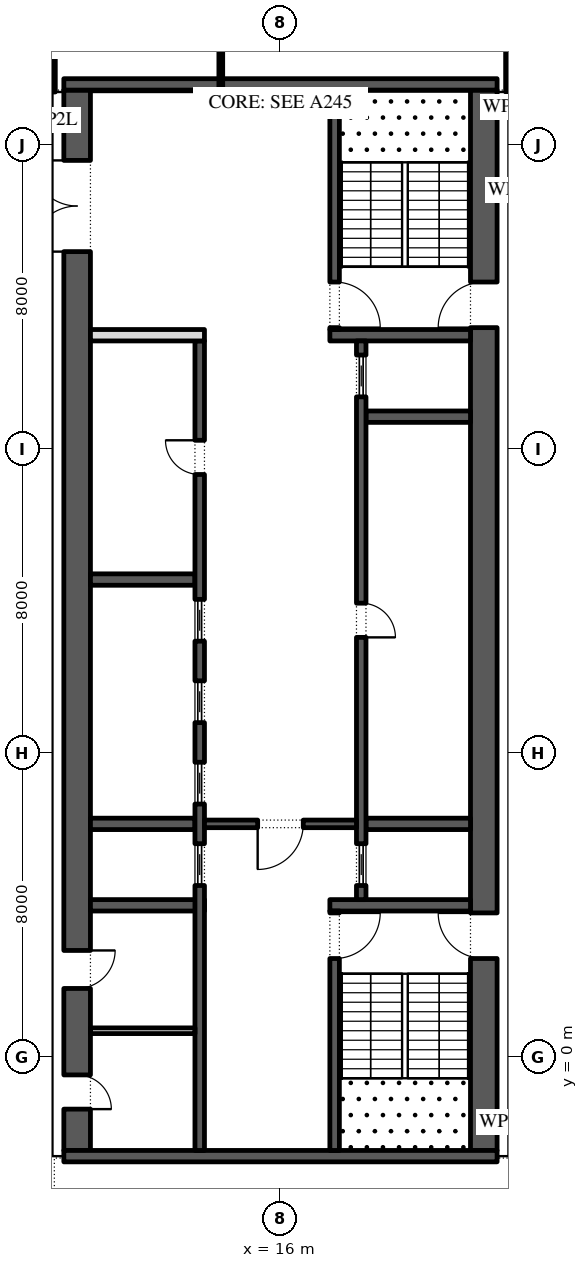
"""IFC4 building model, lengths in metres.
Left out: names, types, materials, properties, quantities, classifications, styles, units other than length and angle.
Written with IfcOpenShell. Run it as: python <this file> out.ifc"""

import sys

from ifc_helpers import new_model, si_unit, direction, frame, frame_2d, origin, place, context, subcontext, project, spatial, rectangle, extrude, element, fill, save


model = new_model("IFC4")
c1 = context("Model", 3, precision=1e-05, world=origin(), true_north=direction((0.0, 1.0)))
c2 = subcontext(c1, "Body", "Model", "MODEL_VIEW")
j1 = project(units=[si_unit("LENGTHUNIT", "METRE"), si_unit("PLANEANGLEUNIT", "RADIAN")], contexts=[c1])
p1 = place(None, origin())
s1 = spatial("IfcSite", under=j1, at=p1, CompositionType="ELEMENT")
p2 = place(p1, origin())
s2 = spatial("IfcBuilding", under=s1, at=p2, CompositionType="ELEMENT")
p3 = place(p2, frame((0.0, 0.0, 192.6)))
s3 = spatial("IfcBuildingStorey", under=s2, at=p3, CompositionType="ELEMENT", Elevation=192.6)
p4 = place(p3, frame((33.157, -5.092, 0.0), z_axis=(0.0, 0.0, 1.0), x_axis=(-0.224950279389, 0.974370243697, 0.0)))
e1 = element("IfcWall", 1, at=p4, inside=s3, PredefinedType="STANDARD", context=c2, shape_type="SweptSolid", body=[
    extrude(rectangle(XDim=49.5, YDim=0.3, at=frame_2d((24.75, 0.0))), origin(), (0.0, 0.0, 1.0), 4.0),
])
p5 = place(p4, frame((2.207, 0.0, 0.0)))
e2 = element("IfcOpeningElement", 2, at=p5, cuts=e1, PredefinedType="OPENING", context=c2, shape_type="SweptSolid", body=[
    extrude(rectangle(XDim=2.4, YDim=3.125, at=frame_2d((1.2, 1.562))), frame((0.0, 0.16, 0.0), z_axis=(0.0, -1.0, 0.0), x_axis=(1.0, 0.0, 0.0)), (0.0, 0.0, 1.0), 0.32),
])
p6 = place(p4, frame((8.121, 0.0, 0.45)))
e3 = element("IfcOpeningElement", 3, at=p6, cuts=e1, PredefinedType="OPENING", context=c2, shape_type="SweptSolid", body=[
    extrude(rectangle(XDim=4.5, YDim=2.875, at=frame_2d((2.25, 1.438))), frame((0.0, 0.16, 0.0), z_axis=(0.0, -1.0, 0.0), x_axis=(1.0, 0.0, 0.0)), (0.0, 0.0, 1.0), 0.32),
])
p7 = place(p4, frame((15.236, 0.0, 0.45)))
e4 = element("IfcOpeningElement", 4, at=p7, cuts=e1, PredefinedType="OPENING", context=c2, shape_type="SweptSolid", body=[
    extrude(rectangle(XDim=4.5, YDim=2.875, at=frame_2d((2.25, 1.438))), frame((0.0, 0.16, 0.0), z_axis=(0.0, -1.0, 0.0), x_axis=(1.0, 0.0, 0.0)), (0.0, 0.0, 1.0), 0.32),
])
p8 = place(p4, frame((22.35, 0.0, 0.45)))
e5 = element("IfcOpeningElement", 5, at=p8, cuts=e1, PredefinedType="OPENING", context=c2, shape_type="SweptSolid", body=[
    extrude(rectangle(XDim=4.5, YDim=3.0, at=frame_2d((2.25, 1.5))), frame((0.0, 0.16, 0.0), z_axis=(0.0, -1.0, 0.0), x_axis=(1.0, 0.0, 0.0)), (0.0, 0.0, 1.0), 0.32),
])
p9 = place(p4, frame((30.514, 0.0, 0.0)))
e6 = element("IfcOpeningElement", 6, at=p9, cuts=e1, PredefinedType="OPENING", context=c2, shape_type="SweptSolid", body=[
    extrude(rectangle(XDim=2.4, YDim=3.45, at=frame_2d((1.2, 1.725))), frame((0.0, 0.16, 0.0), z_axis=(0.0, -1.0, 0.0), x_axis=(1.0, 0.0, 0.0)), (0.0, 0.0, 1.0), 0.32),
])
p10 = place(p4, frame((36.579, 0.0, 0.45)))
e7 = element("IfcOpeningElement", 7, at=p10, cuts=e1, PredefinedType="OPENING", context=c2, shape_type="SweptSolid", body=[
    extrude(rectangle(XDim=4.5, YDim=3.05, at=frame_2d((2.25, 1.525))), frame((0.0, 0.16, 0.0), z_axis=(0.0, -1.0, 0.0), x_axis=(1.0, 0.0, 0.0)), (0.0, 0.0, 1.0), 0.32),
])
p11 = place(p4, frame((43.693, 0.0, 0.45)))
e8 = element("IfcOpeningElement", 8, at=p11, cuts=e1, PredefinedType="OPENING", context=c2, shape_type="SweptSolid", body=[
    extrude(rectangle(XDim=4.5, YDim=3.05, at=frame_2d((2.25, 1.525))), frame((0.0, 0.16, 0.0), z_axis=(0.0, -1.0, 0.0), x_axis=(1.0, 0.0, 0.0)), (0.0, 0.0, 1.0), 0.32),
])
p12 = place(p3, frame((21.35, -2.45, 0.0), z_axis=(0.0, 0.0, 1.0), x_axis=(0.0, 1.0, 0.0)))
e9 = element("IfcWall", 9, at=p12, inside=s3, PredefinedType="SHEAR", context=c2, shape_type="SweptSolid", body=[
    extrude(rectangle(XDim=27.9, YDim=0.7, at=frame_2d((13.95, 0.0))), origin(), (0.0, 0.0, 1.0), 4.0),
])
p13 = place(p12, frame((5.05, 0.0, 0.0)))
e10 = element("IfcOpeningElement", 10, at=p13, cuts=e9, PredefinedType="OPENING", context=c2, shape_type="SweptSolid", body=[
    extrude(rectangle(XDim=1.2, YDim=2.1, at=frame_2d((0.6, 1.05))), frame((0.0, 0.36, 0.0), z_axis=(0.0, -1.0, 0.0), x_axis=(1.0, 0.0, 0.0)), (0.0, 0.0, 1.0), 0.72),
])
p14 = place(p12, frame((21.65, 0.0, 0.0)))
e11 = element("IfcOpeningElement", 11, at=p14, cuts=e9, PredefinedType="OPENING", context=c2, shape_type="SweptSolid", body=[
    extrude(rectangle(XDim=1.2, YDim=2.1, at=frame_2d((0.6, 1.05))), frame((0.0, 0.36, 0.0), z_axis=(0.0, -1.0, 0.0), x_axis=(1.0, 0.0, 0.0)), (0.0, 0.0, 1.0), 0.72),
])
p15 = place(p3, frame((10.65, -2.45, 0.0), z_axis=(0.0, 0.0, 1.0), x_axis=(0.0, 1.0, 0.0)))
e12 = element("IfcWall", 12, at=p15, inside=s3, PredefinedType="SHEAR", context=c2, shape_type="SweptSolid", body=[
    extrude(rectangle(XDim=27.9, YDim=0.7, at=frame_2d((13.95, 0.0))), origin(), (0.0, 0.0, 1.0), 4.0),
])
p16 = place(p15, frame((23.65, 0.0, 0.0)))
e13 = element("IfcOpeningElement", 13, at=p16, cuts=e12, PredefinedType="OPENING", context=c2, shape_type="SweptSolid", body=[
    extrude(rectangle(XDim=2.4, YDim=2.1, at=frame_2d((1.2, 1.05))), frame((0.0, 0.36, 0.0), z_axis=(0.0, -1.0, 0.0), x_axis=(1.0, 0.0, 0.0)), (0.0, 0.0, 1.0), 0.72),
])
p17 = place(p15, frame((1.087, 0.0, 0.0)))
e14 = element("IfcOpeningElement", 14, at=p17, cuts=e12, PredefinedType="OPENING", context=c2, shape_type="SweptSolid", body=[
    extrude(rectangle(XDim=0.9, YDim=2.1, at=frame_2d((0.45, 1.05))), frame((0.0, 0.36, 0.0), z_axis=(0.0, -1.0, 0.0), x_axis=(1.0, 0.0, 0.0)), (0.0, 0.0, 1.0), 0.72),
])
p18 = place(p15, frame((4.262, 0.0, 0.0)))
e15 = element("IfcOpeningElement", 15, at=p18, cuts=e12, PredefinedType="OPENING", context=c2, shape_type="SweptSolid", body=[
    extrude(rectangle(XDim=1.0, YDim=2.1, at=frame_2d((0.5, 1.05))), frame((0.0, 0.36, 0.0), z_axis=(0.0, -1.0, 0.0), x_axis=(1.0, 0.0, 0.0)), (0.0, 0.0, 1.0), 0.72),
])
for number, where, z_axis, x_axis in (
    (16, (10.3, -2.6, 0.0), (0.0, 0.0, 1.0), (1.0, 0.0, 0.0)),
    (17, (10.3, 25.6, 0.0), (0.0, 0.0, 1.0), (1.0, 0.0, 0.0)),
):
    element("IfcWall", number, at=place(p3, frame(where, z_axis=z_axis, x_axis=x_axis)), inside=s3, PredefinedType="SHEAR", context=c2, shape_type="SweptSolid", body=[
        extrude(rectangle(XDim=11.4, YDim=0.3, at=frame_2d((5.7, 0.0))), origin(), (0.0, 0.0, 1.0), 4.0),
    ])
p19 = place(p3, frame((17.3, 4.0, 0.0), z_axis=(0.0, 0.0, 1.0), x_axis=(1.0, 0.0, 0.0)))
e18 = element("IfcWall", 18, at=p19, inside=s3, PredefinedType="SHEAR", context=c2, shape_type="SweptSolid", body=[
    extrude(rectangle(XDim=3.7, YDim=0.3, at=frame_2d((1.85, 0.0))), origin(), (0.0, 0.0, 1.0), 4.0),
])
p20 = place(p3, frame((17.425, -2.45, 0.0), z_axis=(0.0, 0.0, 1.0), x_axis=(0.0, 1.0, 0.0)))
e19 = element("IfcWall", 19, at=p20, inside=s3, PredefinedType="SHEAR", context=c2, shape_type="SweptSolid", body=[
    extrude(rectangle(XDim=6.3, YDim=0.25, at=frame_2d((3.15, 0.0))), origin(), (0.0, 0.0, 1.0), 4.0),
])
p21 = place(p20, frame((5.05, 0.0, 0.0)))
e20 = element("IfcOpeningElement", 20, at=p21, cuts=e19, PredefinedType="OPENING", context=c2, shape_type="SweptSolid", body=[
    extrude(rectangle(XDim=1.2, YDim=2.1, at=frame_2d((0.6, 1.05))), frame((0.0, 0.135, 0.0), z_axis=(0.0, -1.0, 0.0), x_axis=(1.0, 0.0, 0.0)), (0.0, 0.0, 1.0), 0.27),
])
p22 = place(p3, frame((17.3, 19.0, 0.0), z_axis=(0.0, 0.0, 1.0), x_axis=(1.0, 0.0, 0.0)))
e21 = element("IfcWall", 21, at=p22, inside=s3, PredefinedType="SHEAR", context=c2, shape_type="SweptSolid", body=[
    extrude(rectangle(XDim=3.7, YDim=0.3, at=frame_2d((1.85, 0.0))), origin(), (0.0, 0.0, 1.0), 4.0),
])
p23 = place(p3, frame((17.425, 19.15, 0.0), z_axis=(0.0, 0.0, 1.0), x_axis=(0.0, 1.0, 0.0)))
e22 = element("IfcWall", 22, at=p23, inside=s3, PredefinedType="SHEAR", context=c2, shape_type="SweptSolid", body=[
    extrude(rectangle(XDim=6.3, YDim=0.25, at=frame_2d((3.15, 0.0))), origin(), (0.0, 0.0, 1.0), 4.0),
])
p24 = place(p23, frame((0.05, 0.0, 0.0)))
e23 = element("IfcOpeningElement", 23, at=p24, cuts=e22, PredefinedType="OPENING", context=c2, shape_type="SweptSolid", body=[
    extrude(rectangle(XDim=1.2, YDim=2.1, at=frame_2d((0.6, 1.05))), frame((0.0, 0.135, 0.0), z_axis=(0.0, -1.0, 0.0), x_axis=(1.0, 0.0, 0.0)), (0.0, 0.0, 1.0), 0.27),
])
for number, where, z_axis, x_axis in (
    (24, (18.25, 6.143, 0.0), (0.0, 0.0, 1.0), (1.0, 0.0, 0.0)),
    (25, (18.25, 16.857, 0.0), (0.0, 0.0, 1.0), (1.0, 0.0, 0.0)),
):
    element("IfcWall", number, at=place(p3, frame(where, z_axis=z_axis, x_axis=x_axis)), inside=s3, PredefinedType="SHEAR", context=c2, shape_type="SweptSolid", body=[
        extrude(rectangle(XDim=2.75, YDim=0.3, at=frame_2d((1.375, 0.0))), origin(), (0.0, 0.0, 1.0), 4.0),
    ])
p25 = place(p3, frame((18.125, 4.15, 0.0), z_axis=(0.0, 0.0, 1.0), x_axis=(0.0, 1.0, 0.0)))
e26 = element("IfcWall", 26, at=p25, inside=s3, PredefinedType="SHEAR", context=c2, shape_type="SweptSolid", body=[
    extrude(rectangle(XDim=14.7, YDim=0.25, at=frame_2d((7.35, 0.0))), origin(), (0.0, 0.0, 1.0), 4.0),
])
p26 = place(p25, frame((6.9, 0.0, 0.0)))
e27 = element("IfcOpeningElement", 27, at=p26, cuts=e26, PredefinedType="OPENING", context=c2, shape_type="SweptSolid", body=[
    extrude(rectangle(XDim=0.9, YDim=2.1, at=frame_2d((0.45, 1.05))), frame((0.0, 0.135, 0.0), z_axis=(0.0, -1.0, 0.0), x_axis=(1.0, 0.0, 0.0)), (0.0, 0.0, 1.0), 0.27),
])
p27 = place(p25, frame((0.371, 0.0, 0.0)))
e28 = element("IfcOpeningElement", 28, at=p27, cuts=e26, PredefinedType="OPENING", context=c2, shape_type="SweptSolid", body=[
    extrude(rectangle(XDim=1.1, YDim=2.1, at=frame_2d((0.55, 1.05))), frame((0.0, 0.135, 0.0), z_axis=(0.0, -1.0, 0.0), x_axis=(1.0, 0.0, 0.0)), (0.0, 0.0, 1.0), 0.27),
])
p28 = place(p25, frame((13.229, 0.0, 0.0)))
e29 = element("IfcOpeningElement", 29, at=p28, cuts=e26, PredefinedType="OPENING", context=c2, shape_type="SweptSolid", body=[
    extrude(rectangle(XDim=1.1, YDim=2.1, at=frame_2d((0.55, 1.05))), frame((0.0, 0.135, 0.0), z_axis=(0.0, -1.0, 0.0), x_axis=(1.0, 0.0, 0.0)), (0.0, 0.0, 1.0), 0.27),
])
p29 = place(p3, frame((11.0, 4.0, 0.0), z_axis=(0.0, 0.0, 1.0), x_axis=(1.0, 0.0, 0.0)))
e30 = element("IfcWall", 30, at=p29, inside=s3, PredefinedType="SHEAR", context=c2, shape_type="SweptSolid", body=[
    extrude(rectangle(XDim=3.0, YDim=0.3, at=frame_2d((1.5, 0.0))), origin(), (0.0, 0.0, 1.0), 4.0),
])
for number, where, z_axis, x_axis in (
    (31, (11.0, 6.143, 0.0), (0.0, 0.0, 1.0), (1.0, 0.0, 0.0)),
    (32, (11.0, 12.571, 0.0), (0.0, 0.0, 1.0), (1.0, 0.0, 0.0)),
):
    element("IfcWall", number, at=place(p3, frame(where, z_axis=z_axis, x_axis=x_axis)), inside=s3, PredefinedType="SHEAR", context=c2, shape_type="SweptSolid", body=[
        extrude(rectangle(XDim=2.75, YDim=0.3, at=frame_2d((1.375, 0.0))), origin(), (0.0, 0.0, 1.0), 4.0),
    ])
p30 = place(p3, frame((13.875, -2.45, 0.0), z_axis=(0.0, 0.0, 1.0), x_axis=(0.0, 1.0, 0.0)))
e33 = element("IfcWall", 33, at=p30, inside=s3, PredefinedType="SHEAR", context=c2, shape_type="SweptSolid", body=[
    extrude(rectangle(XDim=21.3, YDim=0.25, at=frame_2d((10.65, 0.0))), origin(), (0.0, 0.0, 1.0), 4.0),
])
p31 = place(p30, frame((17.786, 0.0, 0.0)))
e34 = element("IfcOpeningElement", 34, at=p31, cuts=e33, PredefinedType="OPENING", context=c2, shape_type="SweptSolid", body=[
    extrude(rectangle(XDim=0.9, YDim=2.1, at=frame_2d((0.45, 1.05))), frame((0.0, 0.135, 0.0), z_axis=(0.0, -1.0, 0.0), x_axis=(1.0, 0.0, 0.0)), (0.0, 0.0, 1.0), 0.27),
])
p32 = place(p30, frame((6.971, 0.0, 0.0)))
e35 = element("IfcOpeningElement", 35, at=p32, cuts=e33, PredefinedType="OPENING", context=c2, shape_type="SweptSolid", body=[
    extrude(rectangle(XDim=1.1, YDim=2.1, at=frame_2d((0.55, 1.05))), frame((0.0, 0.135, 0.0), z_axis=(0.0, -1.0, 0.0), x_axis=(1.0, 0.0, 0.0)), (0.0, 0.0, 1.0), 0.27),
])
p33 = place(p30, frame((9.114, 0.0, 0.0)))
e36 = element("IfcOpeningElement", 36, at=p33, cuts=e33, PredefinedType="OPENING", context=c2, shape_type="SweptSolid", body=[
    extrude(rectangle(XDim=1.1, YDim=2.1, at=frame_2d((0.55, 1.05))), frame((0.0, 0.135, 0.0), z_axis=(0.0, -1.0, 0.0), x_axis=(1.0, 0.0, 0.0)), (0.0, 0.0, 1.0), 0.27),
])
p34 = place(p30, frame((11.257, 0.0, 0.0)))
e37 = element("IfcOpeningElement", 37, at=p34, cuts=e33, PredefinedType="OPENING", context=c2, shape_type="SweptSolid", body=[
    extrude(rectangle(XDim=1.1, YDim=2.1, at=frame_2d((0.55, 1.05))), frame((0.0, 0.135, 0.0), z_axis=(0.0, -1.0, 0.0), x_axis=(1.0, 0.0, 0.0)), (0.0, 0.0, 1.0), 0.27),
])
p35 = place(p30, frame((13.4, 0.0, 0.0)))
e38 = element("IfcOpeningElement", 38, at=p35, cuts=e33, PredefinedType="OPENING", context=c2, shape_type="SweptSolid", body=[
    extrude(rectangle(XDim=1.1, YDim=2.1, at=frame_2d((0.55, 1.05))), frame((0.0, 0.135, 0.0), z_axis=(0.0, -1.0, 0.0), x_axis=(1.0, 0.0, 0.0)), (0.0, 0.0, 1.0), 0.27),
])
p36 = place(p3, frame((11.0, 19.0, 0.0), z_axis=(0.0, 0.0, 1.0), x_axis=(1.0, 0.0, 0.0)))
e39 = element("IfcWall", 39, at=p36, inside=s3, PredefinedType="PARTITIONING", context=c2, shape_type="SweptSolid", body=[
    extrude(rectangle(XDim=3.0, YDim=0.3, at=frame_2d((1.5, 0.0))), origin(), (0.0, 0.0, 1.0), 4.0),
])
p37 = place(p3, frame((14.0, 6.143, 0.0), z_axis=(0.0, 0.0, 1.0), x_axis=(1.0, 0.0, 0.0)))
e40 = element("IfcWall", 40, at=p37, inside=s3, PredefinedType="SHEAR", context=c2, shape_type="SweptSolid", body=[
    extrude(rectangle(XDim=4.0, YDim=0.2, at=frame_2d((2.0, 0.0))), origin(), (0.0, 0.0, 1.0), 4.0),
])
p38 = place(p37, frame((1.4, 0.0, 0.0)))
e41 = element("IfcOpeningElement", 41, at=p38, cuts=e40, PredefinedType="OPENING", context=c2, shape_type="SweptSolid", body=[
    extrude(rectangle(XDim=1.2, YDim=2.1, at=frame_2d((0.6, 1.05))), frame((0.0, 0.11, 0.0), z_axis=(0.0, -1.0, 0.0), x_axis=(1.0, 0.0, 0.0)), (0.0, 0.0, 1.0), 0.22),
])
p39 = place(p3, frame((11.0, 0.7, 0.0), z_axis=(0.0, 0.0, 1.0), x_axis=(1.0, 0.0, 0.0)))
e42 = element("IfcWall", 42, at=p39, inside=s3, PredefinedType="PARTITIONING", context=c2, shape_type="SweptSolid", body=[
    extrude(rectangle(XDim=2.75, YDim=0.15, at=frame_2d((1.375, 0.0))), origin(), (0.0, 0.0, 1.0), 4.0),
])
p40 = place(p3, frame((10.0, 27.125, 0.0), z_axis=(0.0, 0.0, 1.0), x_axis=(0.0, -1.0, 0.0)))
e43 = element("IfcWall", 43, at=p40, inside=s3, PredefinedType="PARTITIONING", context=c2, shape_type="SweptSolid", body=[
    extrude(rectangle(XDim=1.725, YDim=0.15, at=frame_2d((0.863, 0.0))), origin(), (0.0, 0.0, 1.0), 3.02),
])
p41 = place(p3, frame((14.43, 31.45, 0.0), z_axis=(0.0, 0.0, 1.0), x_axis=(0.0, -1.0, 0.0)))
e44 = element("IfcWall", 44, at=p41, inside=s3, PredefinedType="PARTITIONING", context=c2, shape_type="SweptSolid", body=[
    extrude(rectangle(XDim=6.05, YDim=0.1, at=frame_2d((3.025, 0.0))), origin(), (0.0, 0.0, 1.0), 4.0),
])
p42 = place(p3, frame((22.0, 25.4, 0.0), z_axis=(0.0, 0.0, 1.0), x_axis=(0.0, 1.0, 0.0)))
e45 = element("IfcWall", 45, at=p42, inside=s3, PredefinedType="PARTITIONING", context=c2, shape_type="SweptSolid", body=[
    extrude(rectangle(XDim=1.875, YDim=0.15, at=frame_2d((0.938, 0.0))), origin(), (0.0, 0.0, 1.0), 4.0),
])
p43 = place(p26, frame((0.9, -0.2, 0.0), z_axis=(0.0, 0.0, 1.0), x_axis=(-1.0, 0.0, 0.0)))
e46 = element("IfcDoor", 46, at=p43, inside=s3, OperationType="SINGLE_SWING_LEFT", PredefinedType="DOOR", context=c2, shape_type="SweptSolid", body=[
    extrude(rectangle(XDim=0.9, YDim=2.1, at=frame_2d((0.45, 1.05))), frame((0.0, -0.075, 0.0), z_axis=(0.0, -1.0, 0.0), x_axis=(1.0, 0.0, 0.0)), (0.0, 0.0, 1.0), 0.05),
])
fill(e27, e46)
p44 = place(p27, origin())
e47 = element("IfcDoor", 47, at=p44, inside=s3, OperationType="SLIDING_TO_LEFT", PredefinedType="DOOR", context=c2, shape_type="SweptSolid", body=[
    extrude(rectangle(XDim=1.1, YDim=2.1, at=frame_2d((0.55, 1.05))), frame((0.0, 0.025, 0.0), z_axis=(0.0, -1.0, 0.0), x_axis=(1.0, 0.0, 0.0)), (0.0, 0.0, 1.0), 0.05),
])
fill(e28, e47)
p45 = place(p28, origin())
e48 = element("IfcDoor", 48, at=p45, inside=s3, OperationType="SLIDING_TO_LEFT", PredefinedType="DOOR", context=c2, shape_type="SweptSolid", body=[
    extrude(rectangle(XDim=1.1, YDim=2.1, at=frame_2d((0.55, 1.05))), frame((0.0, 0.025, 0.0), z_axis=(0.0, -1.0, 0.0), x_axis=(1.0, 0.0, 0.0)), (0.0, 0.0, 1.0), 0.05),
])
fill(e29, e48)
p46 = place(p31, origin())
e49 = element("IfcDoor", 49, at=p46, inside=s3, OperationType="SINGLE_SWING_LEFT", PredefinedType="DOOR", context=c2, shape_type="SweptSolid", body=[
    extrude(rectangle(XDim=0.9, YDim=2.1, at=frame_2d((0.45, 1.05))), frame((0.0, 0.125, 0.0), z_axis=(0.0, -1.0, 0.0), x_axis=(1.0, 0.0, 0.0)), (0.0, 0.0, 1.0), 0.05),
])
fill(e34, e49)
p47 = place(p32, origin())
e50 = element("IfcDoor", 50, at=p47, inside=s3, OperationType="SLIDING_TO_LEFT", PredefinedType="DOOR", context=c2, shape_type="SweptSolid", body=[
    extrude(rectangle(XDim=1.1, YDim=2.1, at=frame_2d((0.55, 1.05))), frame((0.0, 0.025, 0.0), z_axis=(0.0, -1.0, 0.0), x_axis=(1.0, 0.0, 0.0)), (0.0, 0.0, 1.0), 0.05),
])
fill(e35, e50)
p48 = place(p33, origin())
e51 = element("IfcDoor", 51, at=p48, inside=s3, OperationType="SLIDING_TO_LEFT", PredefinedType="DOOR", context=c2, shape_type="SweptSolid", body=[
    extrude(rectangle(XDim=1.1, YDim=2.1, at=frame_2d((0.55, 1.05))), frame((0.0, 0.025, 0.0), z_axis=(0.0, -1.0, 0.0), x_axis=(1.0, 0.0, 0.0)), (0.0, 0.0, 1.0), 0.05),
])
fill(e36, e51)
p49 = place(p34, origin())
e52 = element("IfcDoor", 52, at=p49, inside=s3, OperationType="SLIDING_TO_LEFT", PredefinedType="DOOR", context=c2, shape_type="SweptSolid", body=[
    extrude(rectangle(XDim=1.1, YDim=2.1, at=frame_2d((0.55, 1.05))), frame((0.0, 0.025, 0.0), z_axis=(0.0, -1.0, 0.0), x_axis=(1.0, 0.0, 0.0)), (0.0, 0.0, 1.0), 0.05),
])
fill(e37, e52)
p50 = place(p35, origin())
e53 = element("IfcDoor", 53, at=p50, inside=s3, OperationType="SLIDING_TO_LEFT", PredefinedType="DOOR", context=c2, shape_type="SweptSolid", body=[
    extrude(rectangle(XDim=1.1, YDim=2.1, at=frame_2d((0.55, 1.05))), frame((0.0, 0.025, 0.0), z_axis=(0.0, -1.0, 0.0), x_axis=(1.0, 0.0, 0.0)), (0.0, 0.0, 1.0), 0.05),
])
fill(e38, e53)
p51 = place(p38, frame((1.2, 0.0, 0.0), z_axis=(0.0, 0.0, 1.0), x_axis=(-1.0, 0.0, 0.0)))
e54 = element("IfcDoor", 54, at=p51, inside=s3, OperationType="SINGLE_SWING_LEFT", PredefinedType="DOOR", context=c2, shape_type="SweptSolid", body=[
    extrude(rectangle(XDim=1.2, YDim=2.1, at=frame_2d((0.6, 1.05))), frame((0.0, 0.025, 0.0), z_axis=(0.0, -1.0, 0.0), x_axis=(1.0, 0.0, 0.0)), (0.0, 0.0, 1.0), 0.05),
])
fill(e41, e54)
p52 = place(p16, origin())
e55 = element("IfcDoor", 55, at=p52, inside=s3, OperationType="DOUBLE_DOOR_SINGLE_SWING", PredefinedType="DOOR", context=c2, shape_type="SweptSolid", body=[
    extrude(rectangle(XDim=2.4, YDim=2.1, at=frame_2d((1.2, 1.05))), frame((0.0, 0.025, 0.0), z_axis=(0.0, -1.0, 0.0), x_axis=(1.0, 0.0, 0.0)), (0.0, 0.0, 1.0), 0.05),
])
fill(e13, e55)
p53 = place(p21, frame((1.2, 0.0, 0.0), z_axis=(0.0, 0.0, 1.0), x_axis=(-1.0, 0.0, 0.0)))
e56 = element("IfcDoor", 56, at=p53, inside=s3, OperationType="SINGLE_SWING_RIGHT", PredefinedType="DOOR", context=c2, shape_type="SweptSolid", body=[
    extrude(rectangle(XDim=1.2, YDim=2.1, at=frame_2d((0.6, 1.05))), frame((0.0, 0.025, 0.0), z_axis=(0.0, -1.0, 0.0), x_axis=(1.0, 0.0, 0.0)), (0.0, 0.0, 1.0), 0.05),
])
fill(e20, e56)
p54 = place(p13, origin())
e57 = element("IfcDoor", 57, at=p54, inside=s3, OperationType="SINGLE_SWING_LEFT", PredefinedType="DOOR", context=c2, shape_type="SweptSolid", body=[
    extrude(rectangle(XDim=1.2, YDim=2.1, at=frame_2d((0.6, 1.05))), frame((0.0, 0.025, 0.0), z_axis=(0.0, -1.0, 0.0), x_axis=(1.0, 0.0, 0.0)), (0.0, 0.0, 1.0), 0.05),
])
fill(e10, e57)
p55 = place(p24, frame((1.2, 0.0, 0.0), z_axis=(0.0, 0.0, 1.0), x_axis=(-1.0, 0.0, 0.0)))
e58 = element("IfcDoor", 58, at=p55, inside=s3, OperationType="SINGLE_SWING_LEFT", PredefinedType="DOOR", context=c2, shape_type="SweptSolid", body=[
    extrude(rectangle(XDim=1.2, YDim=2.1, at=frame_2d((0.6, 1.05))), frame((0.0, 0.025, 0.0), z_axis=(0.0, -1.0, 0.0), x_axis=(1.0, 0.0, 0.0)), (0.0, 0.0, 1.0), 0.05),
])
fill(e23, e58)
p56 = place(p14, origin())
e59 = element("IfcDoor", 59, at=p56, inside=s3, OperationType="SINGLE_SWING_RIGHT", PredefinedType="DOOR", context=c2, shape_type="SweptSolid", body=[
    extrude(rectangle(XDim=1.2, YDim=2.1, at=frame_2d((0.6, 1.05))), frame((0.0, 0.025, 0.0), z_axis=(0.0, -1.0, 0.0), x_axis=(1.0, 0.0, 0.0)), (0.0, 0.0, 1.0), 0.05),
])
fill(e11, e59)
p57 = place(p17, frame((0.9, -0.65, 0.0), z_axis=(0.0, 0.0, 1.0), x_axis=(-1.0, 0.0, 0.0)))
e60 = element("IfcDoor", 60, at=p57, inside=s3, OperationType="SINGLE_SWING_LEFT", PredefinedType="DOOR", context=c2, shape_type="SweptSolid", body=[
    extrude(rectangle(XDim=0.9, YDim=2.1, at=frame_2d((0.45, 1.05))), frame((0.0, -0.3, 0.0), z_axis=(0.0, -1.0, 0.0), x_axis=(1.0, 0.0, 0.0)), (0.0, 0.0, 1.0), 0.05),
])
fill(e14, e60)
p58 = place(p18, frame((1.0, -0.65, 0.0), z_axis=(0.0, 0.0, 1.0), x_axis=(-1.0, 0.0, 0.0)))
e61 = element("IfcDoor", 61, at=p58, inside=s3, OperationType="SINGLE_SWING_RIGHT", PredefinedType="DOOR", context=c2, shape_type="SweptSolid", body=[
    extrude(rectangle(XDim=1.0, YDim=2.1, at=frame_2d((0.5, 1.05))), frame((0.0, -0.3, 0.0), z_axis=(0.0, -1.0, 0.0), x_axis=(1.0, 0.0, 0.0)), (0.0, 0.0, 1.0), 0.05),
])
fill(e15, e61)
save(model, sys.argv[1])
